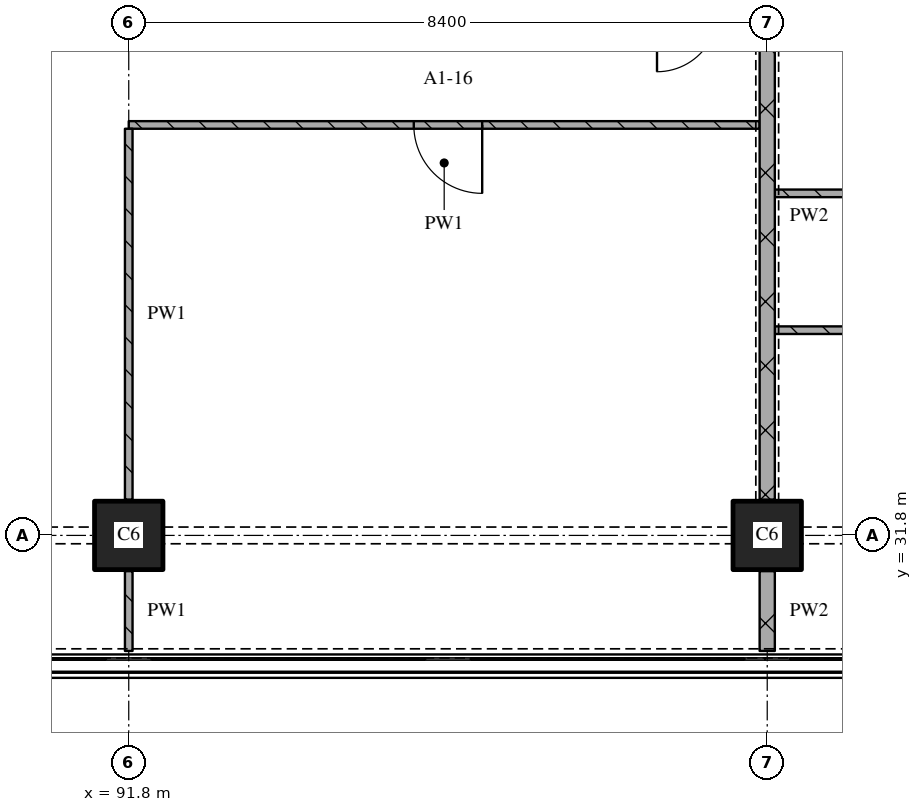
"""IFC4 building model, lengths in metres.
Left out: names, types, materials, properties, quantities, classifications, styles, units other than length and angle.
Written with IfcOpenShell. Run it as: python <this file> out.ifc"""

import sys

from ifc_helpers import new_model, si_unit, direction, frame, frame_2d, origin, origin_2d, place, context, subcontext, project, spatial, rectangle, extrude, element, fill, save


model = new_model("IFC4")
c1 = context("Model", 3, precision=1e-05, world=origin(), true_north=direction((0.0, 1.0)))
c2 = subcontext(c1, "Body", "Model", "MODEL_VIEW")
j1 = project(units=[si_unit("LENGTHUNIT", "METRE"), si_unit("PLANEANGLEUNIT", "RADIAN")], contexts=[c1])
p1 = place(None, origin())
s1 = spatial("IfcSite", under=j1, at=p1, CompositionType="ELEMENT")
p2 = place(p1, origin())
s2 = spatial("IfcBuilding", under=s1, at=p2, CompositionType="ELEMENT")
p3 = place(p2, frame((0.0, 0.0, 40.8)))
s3 = spatial("IfcBuildingStorey", under=s2, at=p3, CompositionType="ELEMENT", Elevation=40.8)
for number, where, z_axis, x_axis in (
    (1, (91.8, 31.8, 0.0), (0.0, 0.0, 1.0), (1.0, 0.0, 0.0)),
    (2, (100.2, 31.8, 0.0), (0.0, 0.0, 1.0), (1.0, 0.0, 0.0)),
):
    element("IfcColumn", number, at=place(p3, frame(where, z_axis=z_axis, x_axis=x_axis)), inside=s3, PredefinedType="COLUMN", context=c2, shape_type="SweptSolid", body=[
        extrude(rectangle(XDim=0.9, YDim=0.9, at=origin_2d()), origin(), (0.0, 0.0, 1.0), 3.6),
    ])
p4 = place(p3, frame((117.0, 34.5, 0.0), z_axis=(0.0, 0.0, 1.0), x_axis=(-1.0, 0.0, 0.0)))
e3 = element("IfcWall", 3, at=p4, inside=s3, PredefinedType="PARTITIONING", context=c2, shape_type="SweptSolid", body=[
    extrude(rectangle(XDim=16.7, YDim=0.1, at=frame_2d((8.35, 0.0))), origin(), (0.0, 0.0, 1.0), 3.32),
])
p5 = place(p4, frame((12.15, 0.0, 0.0)))
e4 = element("IfcOpeningElement", 4, at=p5, cuts=e3, PredefinedType="OPENING", context=c2, shape_type="SweptSolid", body=[
    extrude(rectangle(XDim=0.9, YDim=2.1, at=frame_2d((0.45, 1.05))), frame((0.0, 0.06, 0.0), z_axis=(0.0, -1.0, 0.0), x_axis=(1.0, 0.0, 0.0)), (0.0, 0.0, 1.0), 0.12),
])
p6 = place(p3, frame((100.3, 36.3, 0.0), z_axis=(0.0, 0.0, 1.0), x_axis=(1.0, 0.0, 0.0)))
e5 = element("IfcWall", 5, at=p6, inside=s3, PredefinedType="PARTITIONING", context=c2, shape_type="SweptSolid", body=[
    extrude(rectangle(XDim=11.0, YDim=0.1, at=frame_2d((5.5, 0.0))), origin(), (0.0, 0.0, 1.0), 3.32),
])
p7 = place(p6, frame((1.75, 0.0, 0.0)))
e6 = element("IfcOpeningElement", 6, at=p7, cuts=e5, PredefinedType="OPENING", context=c2, shape_type="SweptSolid", body=[
    extrude(rectangle(XDim=0.8, YDim=2.1, at=frame_2d((0.4, 1.05))), frame((0.0, 0.06, 0.0), z_axis=(0.0, -1.0, 0.0), x_axis=(1.0, 0.0, 0.0)), (0.0, 0.0, 1.0), 0.12),
])
p8 = place(p6, frame((6.25, 0.0, 0.0)))
e7 = element("IfcOpeningElement", 7, at=p8, cuts=e5, PredefinedType="OPENING", context=c2, shape_type="SweptSolid", body=[
    extrude(rectangle(XDim=0.8, YDim=2.1, at=frame_2d((0.4, 1.05))), frame((0.0, 0.06, 0.0), z_axis=(0.0, -1.0, 0.0), x_axis=(1.0, 0.0, 0.0)), (0.0, 0.0, 1.0), 0.12),
])
p9 = place(p3, frame((100.1, 37.2, 0.0), z_axis=(0.0, 0.0, 1.0), x_axis=(-1.0, 0.0, 0.0)))
e8 = element("IfcWall", 8, at=p9, inside=s3, PredefinedType="PARTITIONING", context=c2, shape_type="SweptSolid", body=[
    extrude(rectangle(XDim=8.3, YDim=0.1, at=frame_2d((4.15, 0.0))), origin(), (0.0, 0.0, 1.0), 3.32),
])
p10 = place(p9, frame((3.65, 0.0, 0.0)))
e9 = element("IfcOpeningElement", 9, at=p10, cuts=e8, PredefinedType="OPENING", context=c2, shape_type="SweptSolid", body=[
    extrude(rectangle(XDim=0.9, YDim=2.1, at=frame_2d((0.45, 1.05))), frame((0.0, 0.06, 0.0), z_axis=(0.0, -1.0, 0.0), x_axis=(1.0, 0.0, 0.0)), (0.0, 0.0, 1.0), 0.12),
])
p11 = place(p3, frame((91.8, 31.33, 0.0), z_axis=(0.0, 0.0, 1.0), x_axis=(0.0, -1.0, 0.0)))
e10 = element("IfcWall", 10, at=p11, inside=s3, PredefinedType="PARTITIONING", context=c2, shape_type="SweptSolid", body=[
    extrude(rectangle(XDim=1.05, YDim=0.1, at=frame_2d((0.525, 0.0))), origin(), (0.0, 0.0, 1.0), 3.32),
])
p12 = place(p3, frame((91.8, 37.15, 0.0), z_axis=(0.0, 0.0, 1.0), x_axis=(0.0, -1.0, 0.0)))
e11 = element("IfcWall", 11, at=p12, inside=s3, PredefinedType="PARTITIONING", context=c2, shape_type="SweptSolid", body=[
    extrude(rectangle(XDim=4.88, YDim=0.1, at=frame_2d((2.44, 0.0))), origin(), (0.0, 0.0, 1.0), 3.32),
])
p13 = place(p3, frame((100.2, 31.33, 0.0), z_axis=(0.0, 0.0, 1.0), x_axis=(0.0, -1.0, 0.0)))
e12 = element("IfcWall", 12, at=p13, inside=s3, PredefinedType="PARTITIONING", context=c2, shape_type="SweptSolid", body=[
    extrude(rectangle(XDim=1.05, YDim=0.2, at=frame_2d((0.525, 0.0))), origin(), (0.0, 0.0, 1.0), 3.32),
])
p14 = place(p3, frame((100.2, 39.73, 0.0), z_axis=(0.0, 0.0, 1.0), x_axis=(0.0, -1.0, 0.0)))
e13 = element("IfcWall", 13, at=p14, inside=s3, PredefinedType="PARTITIONING", context=c2, shape_type="SweptSolid", body=[
    extrude(rectangle(XDim=7.46, YDim=0.2, at=frame_2d((3.73, 0.0))), origin(), (0.0, 0.0, 1.0), 2.83),
])
p15 = place(p10, origin())
e14 = element("IfcDoor", 14, at=p15, inside=s3, OperationType="SINGLE_SWING_LEFT", PredefinedType="DOOR", context=c2, shape_type="SweptSolid", body=[
    extrude(rectangle(XDim=0.9, YDim=2.1, at=frame_2d((0.45, 1.05))), frame((0.0, 0.025, 0.0), z_axis=(0.0, -1.0, 0.0), x_axis=(1.0, 0.0, 0.0)), (0.0, 0.0, 1.0), 0.05),
])
fill(e9, e14)
save(model, sys.argv[1])
